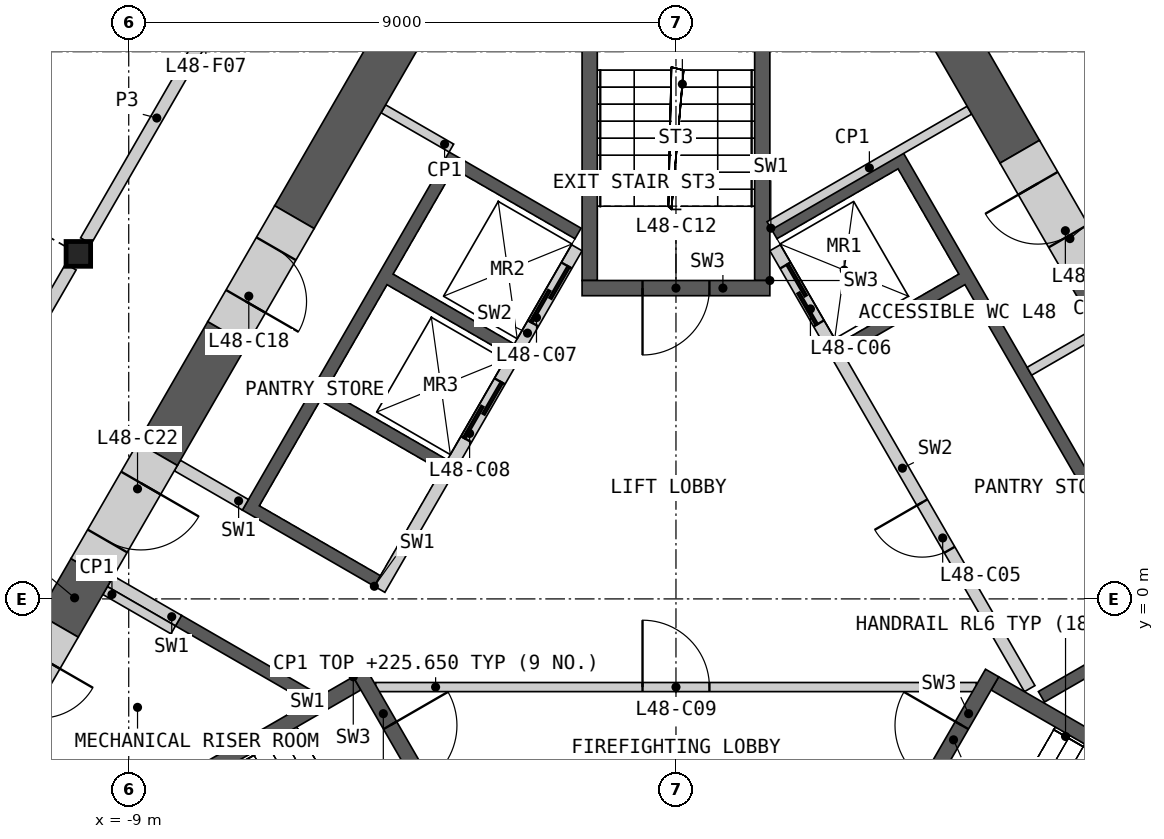
"""IFC4 building model, lengths in metres.
Left out: names, types, materials, properties, quantities, classifications, styles, units other than length and angle.
Written with IfcOpenShell. Run it as: python <this file> out.ifc"""

import sys

from ifc_helpers import new_model, si_unit, direction, frame, frame_2d, origin, origin_2d, place, context, subcontext, project, spatial, polyline, rectangle, i_section, outline, extrude, element, fill, save


model = new_model("IFC4")
c1 = context("Model", 3, precision=1e-05, world=origin(), true_north=direction((0.0, 1.0)))
c2 = subcontext(c1, "Body", "Model", "MODEL_VIEW")
j1 = project(units=[si_unit("LENGTHUNIT", "METRE"), si_unit("PLANEANGLEUNIT", "RADIAN")], contexts=[c1])
p1 = place(None, origin())
s1 = spatial("IfcSite", under=j1, at=p1, CompositionType="ELEMENT")
p2 = place(p1, origin())
s2 = spatial("IfcBuilding", under=s1, at=p2, CompositionType="ELEMENT")
p3 = place(p2, frame((0.0, 0.0, 216.0)))
s3 = spatial("IfcBuildingStorey", under=s2, at=p3, CompositionType="ELEMENT", Elevation=216.0)
p4 = place(p3, frame((-9.828, 5.675, 0.0), z_axis=(0.0, 0.0, 1.0), x_axis=(1.0, 0.0, 0.0)))
e1 = element("IfcColumn", 1, at=p4, inside=s3, PredefinedType="COLUMN", context=c2, shape_type="SweptSolid", body=[
    extrude(i_section(OverallWidth=0.404, OverallDepth=0.407, WebThickness=0.027, FlangeThickness=0.044, at=origin_2d()), origin(), (0.0, 0.0, 1.0), 10.0),
])
p5 = place(p3, origin())
e2 = element("IfcWall", 2, at=p5, inside=s3, PredefinedType="SHEAR", context=c2, shape_type="SweptSolid", body=[
    extrude(outline(polyline([(1.561, 6.097), (3.731, 7.35), (8.231, -0.444), (6.061, -1.697), (5.96, -1.524), (7.952, -0.374), (4.752, 5.169), (2.76, 4.019), (2.66, 4.192), (4.652, 5.342), (3.652, 7.074), (1.66, 5.924), (1.561, 6.097)])), origin(), (0.0, 0.0, 1.0), 9.65),
])
p6 = place(p3, frame((5.817, -1.476, 0.0), z_axis=(0.0, 0.0, 1.0), x_axis=(-0.500002616675, 0.866023893041, 0.0)))
e3 = element("IfcWall", 3, at=p6, inside=s3, PredefinedType="SOLIDWALL", context=c2, shape_type="SweptSolid", body=[
    extrude(rectangle(XDim=8.373, YDim=0.2, at=frame_2d((4.187, 0.0))), origin(), (0.0, 0.0, 1.0), 9.65),
])
p7 = place(p6, frame((2.637, 0.0, 0.0)))
e4 = element("IfcOpeningElement", 4, at=p7, cuts=e3, PredefinedType="OPENING", context=c2, shape_type="SweptSolid", body=[
    extrude(rectangle(XDim=0.9, YDim=2.1, at=frame_2d((0.45, 1.05))), frame((0.0, 0.11, 0.0), z_axis=(0.0, -1.0, 0.0), x_axis=(1.0, 0.0, 0.0)), (0.0, 0.0, 1.0), 0.22),
])
p8 = place(p6, frame((6.937, 0.0, 0.0)))
e5 = element("IfcOpeningElement", 5, at=p8, cuts=e3, PredefinedType="OPENING", context=c2, shape_type="SweptSolid", body=[
    extrude(rectangle(XDim=1.1, YDim=2.1, at=frame_2d((0.55, 1.05))), frame((0.0, 0.11, 0.0), z_axis=(0.0, -1.0, 0.0), x_axis=(1.0, 0.0, 0.0)), (0.0, 0.0, 1.0), 0.22),
])
p9 = place(p3, origin())
e6 = element("IfcWall", 6, at=p9, inside=s3, PredefinedType="SHEAR", context=c2, shape_type="SweptSolid", body=[
    extrude(outline(polyline([(-6.061, -1.697), (-8.231, -0.444), (-8.131, -0.271), (-5.96, -1.524), (-6.061, -1.697)])), origin(), (0.0, 0.0, 1.0), 9.65),
])
p10 = place(p3, origin())
e7 = element("IfcWall", 7, at=p10, inside=s3, PredefinedType="SHEAR", context=c2, shape_type="SweptSolid", body=[
    extrude(outline(polyline([(-4.96, 0.208), (-7.131, 1.461), (-3.731, 7.35), (-1.561, 6.097), (-1.66, 5.924), (-3.652, 7.074), (-4.652, 5.342), (-2.66, 4.192), (-2.76, 4.019), (-4.752, 5.169), (-5.752, 3.437), (-3.76, 2.287), (-3.861, 2.113), (-5.852, 3.263), (-6.852, 1.531), (-4.861, 0.381), (-4.96, 0.208)])), origin(), (0.0, 0.0, 1.0), 9.65),
])
p11 = place(p3, frame((-1.631, 5.776, 0.0), z_axis=(0.0, 0.0, 1.0), x_axis=(-0.499992876559, -0.866029516466, 0.0)))
e8 = element("IfcWall", 8, at=p11, inside=s3, PredefinedType="SOLIDWALL", context=c2, shape_type="SweptSolid", body=[
    extrude(rectangle(XDim=6.486, YDim=0.2, at=frame_2d((3.243, 0.0))), origin(), (0.0, 0.0, 1.0), 9.65),
])
p12 = place(p11, frame((0.337, 0.0, 0.0)))
e9 = element("IfcOpeningElement", 9, at=p12, cuts=e8, PredefinedType="OPENING", context=c2, shape_type="SweptSolid", body=[
    extrude(rectangle(XDim=1.1, YDim=2.1, at=frame_2d((0.55, 1.05))), frame((0.0, 0.11, 0.0), z_axis=(0.0, -1.0, 0.0), x_axis=(1.0, 0.0, 0.0)), (0.0, 0.0, 1.0), 0.22),
])
p13 = place(p11, frame((2.537, 0.0, 0.0)))
e10 = element("IfcOpeningElement", 10, at=p13, cuts=e8, PredefinedType="OPENING", context=c2, shape_type="SweptSolid", body=[
    extrude(rectangle(XDim=1.1, YDim=2.1, at=frame_2d((0.55, 1.05))), frame((0.0, 0.11, 0.0), z_axis=(0.0, -1.0, 0.0), x_axis=(1.0, 0.0, 0.0)), (0.0, 0.0, 1.0), 0.22),
])
for number, where, z_axis, x_axis in (
    (11, (-7.081, 1.548, 0.0), (0.0, 0.0, 1.0), (-0.866, 0.5, 0.0)),
    (12, (-8.181, -0.357, 0.0), (0.0, 0.0, 1.0), (-0.866, 0.5, 0.0)),
):
    element("IfcWall", number, at=place(p3, frame(where, z_axis=z_axis, x_axis=x_axis)), inside=s3, PredefinedType="SHEAR", context=c2, shape_type="SweptSolid", body=[
        extrude(rectangle(XDim=1.293, YDim=0.2, at=frame_2d((0.646, 0.0))), origin(), (0.0, 0.0, 1.0), 9.65),
    ])
p14 = place(p3, frame((-4.941, -1.45, 0.0), z_axis=(0.0, 0.0, 1.0), x_axis=(1.0, 0.0, 0.0)))
e13 = element("IfcWall", 13, at=p14, inside=s3, PredefinedType="PARTITIONING", context=c2, shape_type="SweptSolid", body=[
    extrude(rectangle(XDim=9.882, YDim=0.15, at=frame_2d((4.941, 0.0))), origin(), (0.0, 0.0, 1.0), 9.65),
])
p15 = place(p14, frame((4.391, 0.0, 0.0)))
e14 = element("IfcOpeningElement", 14, at=p15, cuts=e13, PredefinedType="OPENING", context=c2, shape_type="SweptSolid", body=[
    extrude(rectangle(XDim=1.1, YDim=2.1, at=frame_2d((0.55, 1.05))), frame((0.0, 0.085, 0.0), z_axis=(0.0, -1.0, 0.0), x_axis=(1.0, 0.0, 0.0)), (0.0, 0.0, 1.0), 0.17),
])
p16 = place(p3, origin())
e15 = element("IfcWall", 15, at=p16, inside=s3, PredefinedType="SHEAR", context=c2, shape_type="SweptSolid", body=[
    extrude(outline(polyline([(-5.307, -1.281), (-10.374, -4.206), (-10.032, -4.298), (-5.182, -1.498), (-5.307, -1.281)])), origin(), (0.0, 0.0, 1.0), 9.65),
])
p17 = place(p3, frame((-5.199, -1.219, 0.0), z_axis=(0.0, 0.0, 1.0), x_axis=(0.499982516597, -0.866035497597, 0.0)))
e16 = element("IfcWall", 16, at=p17, inside=s3, PredefinedType="SHEAR", context=c2, shape_type="SweptSolid", body=[
    extrude(rectangle(XDim=3.088, YDim=0.25, at=frame_2d((1.544, 0.0))), origin(), (0.0, 0.0, 1.0), 9.65),
])
p18 = place(p17, frame((0.994, 0.0, 0.0)))
e17 = element("IfcOpeningElement", 17, at=p18, cuts=e16, PredefinedType="OPENING", context=c2, shape_type="SweptSolid", body=[
    extrude(rectangle(XDim=1.1, YDim=2.1, at=frame_2d((0.55, 1.05))), frame((0.0, 0.135, 0.0), z_axis=(0.0, -1.0, 0.0), x_axis=(1.0, 0.0, 0.0)), (0.0, 0.0, 1.0), 0.27),
])
p19 = place(p3, origin())
e18 = element("IfcWall", 18, at=p19, inside=s3, PredefinedType="SHEAR", context=c2, shape_type="SweptSolid", body=[
    extrude(outline(polyline([(10.032, -4.298), (10.374, -4.206), (5.307, -1.281), (5.182, -1.498), (10.032, -4.298)])), origin(), (0.0, 0.0, 1.0), 9.65),
])
p20 = place(p3, frame((3.655, -3.893, 0.0), z_axis=(0.0, 0.0, 1.0), x_axis=(0.499982516597, 0.866035497597, 0.0)))
e19 = element("IfcWall", 19, at=p20, inside=s3, PredefinedType="SHEAR", context=c2, shape_type="SweptSolid", body=[
    extrude(rectangle(XDim=3.088, YDim=0.25, at=frame_2d((1.544, 0.0))), origin(), (0.0, 0.0, 1.0), 9.65),
])
p21 = place(p20, frame((0.994, 0.0, 0.0)))
e20 = element("IfcOpeningElement", 20, at=p21, cuts=e19, PredefinedType="OPENING", context=c2, shape_type="SweptSolid", body=[
    extrude(rectangle(XDim=1.1, YDim=2.1, at=frame_2d((0.55, 1.05))), frame((0.0, 0.135, 0.0), z_axis=(0.0, -1.0, 0.0), x_axis=(1.0, 0.0, 0.0)), (0.0, 0.0, 1.0), 0.27),
])
p22 = place(p3, origin())
e21 = element("IfcWall", 21, at=p22, inside=s3, PredefinedType="SHEAR", context=c2, shape_type="SweptSolid", body=[
    extrude(outline(polyline([(1.544, 5.237), (1.544, 11.087), (1.294, 10.837), (1.294, 5.237), (1.544, 5.237)])), origin(), (0.0, 0.0, 1.0), 9.65),
])
p23 = place(p3, origin())
e22 = element("IfcWall", 22, at=p23, inside=s3, PredefinedType="SHEAR", context=c2, shape_type="SweptSolid", body=[
    extrude(outline(polyline([(-1.294, 10.837), (-1.544, 11.087), (-1.544, 5.237), (-1.294, 5.237), (-1.294, 10.837)])), origin(), (0.0, 0.0, 1.0), 9.65),
])
p24 = place(p3, frame((1.544, 5.112, 0.0), z_axis=(0.0, 0.0, 1.0), x_axis=(-1.0, 0.0, 0.0)))
e23 = element("IfcWall", 23, at=p24, inside=s3, PredefinedType="SHEAR", context=c2, shape_type="SweptSolid", body=[
    extrude(rectangle(XDim=3.088, YDim=0.25, at=frame_2d((1.544, 0.0))), origin(), (0.0, 0.0, 1.0), 9.65),
])
p25 = place(p24, frame((0.994, 0.0, 0.0)))
e24 = element("IfcOpeningElement", 24, at=p25, cuts=e23, PredefinedType="OPENING", context=c2, shape_type="SweptSolid", body=[
    extrude(rectangle(XDim=1.1, YDim=2.1, at=frame_2d((0.55, 1.05))), frame((0.0, 0.135, 0.0), z_axis=(0.0, -1.0, 0.0), x_axis=(1.0, 0.0, 0.0)), (0.0, 0.0, 1.0), 0.27),
])
for number, where, z_axis, x_axis in (
    (25, (-8.268, -0.509, 0.0), (0.0, 0.0, 1.0), (-0.866, 0.5, 0.0)),
    (26, (-3.693, 7.415, 0.0), (0.0, 0.0, 1.0), (-0.866, 0.5, 0.0)),
    (27, (6.932, 4.391, 0.0), (0.0, 0.0, 1.0), (-0.866, -0.5, 0.0)),
):
    element("IfcWall", number, at=place(p3, frame(where, z_axis=z_axis, x_axis=x_axis)), inside=s3, PredefinedType="PARTITIONING", context=c2, shape_type="SweptSolid", body=[
        extrude(rectangle(XDim=1.293, YDim=0.15, at=frame_2d((0.646, 0.0))), origin(), (0.0, 0.0, 1.0), 9.65),
    ])
p26 = place(p3, frame((4.826, 8.039, 0.0), z_axis=(0.0, 0.0, 1.0), x_axis=(-0.86601654697, -0.500015340139, 0.0)))
e28 = element("IfcWall", 28, at=p26, inside=s3, PredefinedType="PARTITIONING", context=c2, shape_type="SweptSolid", body=[
    extrude(rectangle(XDim=3.8, YDim=0.15, at=frame_2d((1.9, 0.0))), origin(), (0.0, 0.0, 1.0), 9.65),
])
p27 = place(p3, frame((5.654, 7.355, 0.0), z_axis=(0.0, 0.0, 1.0), x_axis=(-0.4999705729, 0.866042392862, 0.0)))
e29 = element("IfcWall", 29, at=p27, inside=s3, PredefinedType="SHEAR", context=c2, shape_type="SweptSolid", body=[
    extrude(rectangle(XDim=4.77, YDim=0.75, at=frame_2d((2.385, 0.0))), origin(), (0.0, 0.0, 1.0), 9.65),
])
p28 = place(p3, frame((8.211, 2.926, 0.0), z_axis=(0.0, 0.0, 1.0), x_axis=(-0.500022172694, 0.866012601995, 0.0)))
e30 = element("IfcWall", 30, at=p28, inside=s3, PredefinedType="SHEAR", context=c2, shape_type="SweptSolid", body=[
    extrude(rectangle(XDim=2.914, YDim=0.75, at=frame_2d((1.457, 0.0))), origin(), (0.0, 0.0, 1.0), 9.65),
])
p29 = place(p3, frame((-0.325, 16.585, 0.0), z_axis=(0.0, 0.0, 1.0), x_axis=(-0.500008939514, -0.866020242492, 0.0)))
e31 = element("IfcWall", 31, at=p29, inside=s3, PredefinedType="SHEAR", context=c2, shape_type="SweptSolid", body=[
    extrude(rectangle(XDim=11.901, YDim=0.75, at=frame_2d((5.951, 0.0))), origin(), (0.0, 0.0, 1.0), 9.65),
])
p30 = place(p3, frame((-7.375, 4.374, 0.0), z_axis=(0.0, 0.0, 1.0), x_axis=(-0.499952165731, -0.866053019151, 0.0)))
e32 = element("IfcWall", 32, at=p30, inside=s3, PredefinedType="SHEAR", context=c2, shape_type="SweptSolid", body=[
    extrude(rectangle(XDim=2.3, YDim=0.75, at=frame_2d((1.15, 0.0))), origin(), (0.0, 0.0, 1.0), 9.65),
])
p31 = place(p3, frame((-9.625, 0.477, 0.0), z_axis=(0.0, 0.0, 1.0), x_axis=(-0.499928435111, -0.86606671785, 0.0)))
e33 = element("IfcWall", 33, at=p31, inside=s3, PredefinedType="SHEAR", context=c2, shape_type="SweptSolid", body=[
    extrude(rectangle(XDim=1.06, YDim=0.75, at=frame_2d((0.53, 0.0))), origin(), (0.0, 0.0, 1.0), 9.65),
])
p32 = place(p3, frame((-6.275, 6.279, 0.0), z_axis=(0.0, 0.0, 1.0), x_axis=(-0.499946605688, -0.86605622881, 0.0)))
e34 = element("IfcWall", 34, at=p32, inside=s3, PredefinedType="SHEAR", context=c2, shape_type="SweptSolid", body=[
    extrude(rectangle(XDim=2.2, YDim=0.75, at=frame_2d((1.1, 0.0))), origin(), (0.0, 0.0, 1.0), 9.65),
])
p33 = place(p32, frame((0.6, 0.0, 0.0)))
e35 = element("IfcOpeningElement", 35, at=p33, cuts=e34, PredefinedType="OPENING", context=c2, shape_type="SweptSolid", body=[
    extrude(rectangle(XDim=1.0, YDim=2.1, at=frame_2d((0.5, 1.05))), frame((0.0, 0.385, 0.0), z_axis=(0.0, -1.0, 0.0), x_axis=(1.0, 0.0, 0.0)), (0.0, 0.0, 1.0), 0.77),
])
p34 = place(p3, frame((6.754, 5.45, 0.0), z_axis=(0.0, 0.0, 1.0), x_axis=(-0.499994660107, 0.866028486751, 0.0)))
e36 = element("IfcWall", 36, at=p34, inside=s3, PredefinedType="SHEAR", context=c2, shape_type="SweptSolid", body=[
    extrude(rectangle(XDim=2.2, YDim=0.75, at=frame_2d((1.1, 0.0))), origin(), (0.0, 0.0, 1.0), 9.65),
])
p35 = place(p34, frame((0.6, 0.0, 0.0)))
e37 = element("IfcOpeningElement", 37, at=p35, cuts=e36, PredefinedType="OPENING", context=c2, shape_type="SweptSolid", body=[
    extrude(rectangle(XDim=1.0, YDim=2.1, at=frame_2d((0.5, 1.05))), frame((0.0, 0.385, 0.0), z_axis=(0.0, -1.0, 0.0), x_axis=(1.0, 0.0, 0.0)), (0.0, 0.0, 1.0), 0.77),
])
p36 = place(p3, frame((-10.156, -0.442, 0.0), z_axis=(0.0, 0.0, 1.0), x_axis=(-0.499946605688, -0.86605622881, 0.0)))
e38 = element("IfcWall", 38, at=p36, inside=s3, PredefinedType="SHEAR", context=c2, shape_type="SweptSolid", body=[
    extrude(rectangle(XDim=2.2, YDim=0.75, at=frame_2d((1.1, 0.0))), origin(), (0.0, 0.0, 1.0), 9.65),
])
p37 = place(p36, frame((0.6, 0.0, 0.0)))
e39 = element("IfcOpeningElement", 39, at=p37, cuts=e38, PredefinedType="OPENING", context=c2, shape_type="SweptSolid", body=[
    extrude(rectangle(XDim=1.0, YDim=2.1, at=frame_2d((0.5, 1.05))), frame((0.0, 0.385, 0.0), z_axis=(0.0, -1.0, 0.0), x_axis=(1.0, 0.0, 0.0)), (0.0, 0.0, 1.0), 0.77),
])
p38 = place(p3, frame((-8.525, 2.382, 0.0), z_axis=(0.0, 0.0, 1.0), x_axis=(-0.500077893725, -0.86598042715, 0.0)))
e40 = element("IfcWall", 40, at=p38, inside=s3, PredefinedType="SHEAR", context=c2, shape_type="SweptSolid", body=[
    extrude(rectangle(XDim=2.2, YDim=0.75, at=frame_2d((1.1, 0.0))), origin(), (0.0, 0.0, 1.0), 9.65),
])
p39 = place(p38, frame((0.55, 0.0, 0.0)))
e41 = element("IfcOpeningElement", 41, at=p39, cuts=e40, PredefinedType="OPENING", context=c2, shape_type="SweptSolid", body=[
    extrude(rectangle(XDim=1.1, YDim=2.1, at=frame_2d((0.55, 1.05))), frame((0.0, 0.385, 0.0), z_axis=(0.0, -1.0, 0.0), x_axis=(1.0, 0.0, 0.0)), (0.0, 0.0, 1.0), 0.77),
])
p40 = place(p3, frame((5.038, 13.972, 0.0), z_axis=(0.0, 0.0, 1.0), x_axis=(0.50000393355, -0.866023132736, 0.0)))
e42 = element("IfcWall", 42, at=p40, inside=s3, PredefinedType="PARTITIONING", context=c2, shape_type="SweptSolid", body=[
    extrude(rectangle(XDim=9.335, YDim=0.2, at=frame_2d((4.667, 0.0))), origin(), (0.0, 0.0, 1.0), 9.65),
])
p41 = place(p40, frame((3.768, 0.0, 0.0)))
e43 = element("IfcOpeningElement", 43, at=p41, cuts=e42, PredefinedType="OPENING", context=c2, shape_type="SweptSolid", body=[
    extrude(rectangle(XDim=1.8, YDim=2.1, at=frame_2d((0.9, 1.05))), frame((0.0, 0.11, 0.0), z_axis=(0.0, -1.0, 0.0), x_axis=(1.0, 0.0, 0.0)), (0.0, 0.0, 1.0), 0.22),
])
p42 = place(p3, frame((-9.705, 5.888, 0.0), z_axis=(0.0, 0.0, 1.0), x_axis=(0.50000393355, 0.866023132736, 0.0)))
e44 = element("IfcWall", 44, at=p42, inside=s3, PredefinedType="PARTITIONING", context=c2, shape_type="SweptSolid", body=[
    extrude(rectangle(XDim=9.335, YDim=0.2, at=frame_2d((4.667, 0.0))), origin(), (0.0, 0.0, 1.0), 9.65),
])
p43 = place(p42, frame((3.768, 0.0, 0.0)))
e45 = element("IfcOpeningElement", 45, at=p43, cuts=e44, PredefinedType="OPENING", context=c2, shape_type="SweptSolid", body=[
    extrude(rectangle(XDim=1.8, YDim=2.1, at=frame_2d((0.9, 1.05))), frame((0.0, 0.11, 0.0), z_axis=(0.0, -1.0, 0.0), x_axis=(1.0, 0.0, 0.0)), (0.0, 0.0, 1.0), 0.22),
])
p44 = place(p3, frame((-14.619, -2.624, 0.0), z_axis=(0.0, 0.0, 1.0), x_axis=(0.50000393355, 0.866023132736, 0.0)))
e46 = element("IfcWall", 46, at=p44, inside=s3, PredefinedType="PARTITIONING", context=c2, shape_type="SweptSolid", body=[
    extrude(rectangle(XDim=9.335, YDim=0.2, at=frame_2d((4.667, 0.0))), origin(), (0.0, 0.0, 1.0), 9.65),
])
p45 = place(p7, origin())
e47 = element("IfcDoor", 47, at=p45, inside=s3, OperationType="SINGLE_SWING_RIGHT", PredefinedType="DOOR", context=c2, shape_type="SweptSolid", body=[
    extrude(rectangle(XDim=0.9, YDim=2.1, at=frame_2d((0.45, 1.05))), frame((0.0, 0.025, 0.0), z_axis=(0.0, -1.0, 0.0), x_axis=(1.0, 0.0, 0.0)), (0.0, 0.0, 1.0), 0.05),
])
fill(e4, e47)
p46 = place(p8, origin())
e48 = element("IfcDoor", 48, at=p46, inside=s3, OperationType="SLIDING_TO_LEFT", PredefinedType="DOOR", context=c2, shape_type="SweptSolid", body=[
    extrude(rectangle(XDim=1.1, YDim=2.1, at=frame_2d((0.55, 1.05))), frame((0.0, 0.025, 0.0), z_axis=(0.0, -1.0, 0.0), x_axis=(1.0, 0.0, 0.0)), (0.0, 0.0, 1.0), 0.05),
])
fill(e5, e48)
p47 = place(p12, origin())
e49 = element("IfcDoor", 49, at=p47, inside=s3, OperationType="SLIDING_TO_LEFT", PredefinedType="DOOR", context=c2, shape_type="SweptSolid", body=[
    extrude(rectangle(XDim=1.1, YDim=2.1, at=frame_2d((0.55, 1.05))), frame((0.0, 0.025, 0.0), z_axis=(0.0, -1.0, 0.0), x_axis=(1.0, 0.0, 0.0)), (0.0, 0.0, 1.0), 0.05),
])
fill(e9, e49)
p48 = place(p13, origin())
e50 = element("IfcDoor", 50, at=p48, inside=s3, OperationType="SLIDING_TO_LEFT", PredefinedType="DOOR", context=c2, shape_type="SweptSolid", body=[
    extrude(rectangle(XDim=1.1, YDim=2.1, at=frame_2d((0.55, 1.05))), frame((0.0, 0.025, 0.0), z_axis=(0.0, -1.0, 0.0), x_axis=(1.0, 0.0, 0.0)), (0.0, 0.0, 1.0), 0.05),
])
fill(e10, e50)
p49 = place(p15, origin())
e51 = element("IfcDoor", 51, at=p49, inside=s3, OperationType="SINGLE_SWING_LEFT", PredefinedType="DOOR", context=c2, shape_type="SweptSolid", body=[
    extrude(rectangle(XDim=1.1, YDim=2.1, at=frame_2d((0.55, 1.05))), frame((0.0, 0.025, 0.0), z_axis=(0.0, -1.0, 0.0), x_axis=(1.0, 0.0, 0.0)), (0.0, 0.0, 1.0), 0.05),
])
fill(e14, e51)
p50 = place(p18, origin())
e52 = element("IfcDoor", 52, at=p50, inside=s3, OperationType="SINGLE_SWING_LEFT", PredefinedType="DOOR", context=c2, shape_type="SweptSolid", body=[
    extrude(rectangle(XDim=1.1, YDim=2.1, at=frame_2d((0.55, 1.05))), frame((0.0, 0.025, 0.0), z_axis=(0.0, -1.0, 0.0), x_axis=(1.0, 0.0, 0.0)), (0.0, 0.0, 1.0), 0.05),
])
fill(e17, e52)
p51 = place(p21, origin())
e53 = element("IfcDoor", 53, at=p51, inside=s3, OperationType="SINGLE_SWING_RIGHT", PredefinedType="DOOR", context=c2, shape_type="SweptSolid", body=[
    extrude(rectangle(XDim=1.1, YDim=2.1, at=frame_2d((0.55, 1.05))), frame((0.0, 0.025, 0.0), z_axis=(0.0, -1.0, 0.0), x_axis=(1.0, 0.0, 0.0)), (0.0, 0.0, 1.0), 0.05),
])
fill(e20, e53)
p52 = place(p25, origin())
e54 = element("IfcDoor", 54, at=p52, inside=s3, OperationType="SINGLE_SWING_RIGHT", PredefinedType="DOOR", context=c2, shape_type="SweptSolid", body=[
    extrude(rectangle(XDim=1.1, YDim=2.1, at=frame_2d((0.55, 1.05))), frame((0.0, 0.025, 0.0), z_axis=(0.0, -1.0, 0.0), x_axis=(1.0, 0.0, 0.0)), (0.0, 0.0, 1.0), 0.05),
])
fill(e24, e54)
p53 = place(p33, origin())
e55 = element("IfcDoor", 55, at=p53, inside=s3, OperationType="SINGLE_SWING_RIGHT", PredefinedType="DOOR", context=c2, shape_type="SweptSolid", body=[
    extrude(rectangle(XDim=1.0, YDim=2.1, at=frame_2d((0.5, 1.05))), frame((0.0, 0.13, 0.0), z_axis=(0.0, -1.0, 0.0), x_axis=(1.0, 0.0, 0.0)), (0.0, 0.0, 1.0), 0.05),
])
fill(e35, e55)
p54 = place(p35, origin())
e56 = element("IfcDoor", 56, at=p54, inside=s3, OperationType="SINGLE_SWING_RIGHT", PredefinedType="DOOR", context=c2, shape_type="SweptSolid", body=[
    extrude(rectangle(XDim=1.0, YDim=2.1, at=frame_2d((0.5, 1.05))), frame((0.0, 0.13, 0.0), z_axis=(0.0, -1.0, 0.0), x_axis=(1.0, 0.0, 0.0)), (0.0, 0.0, 1.0), 0.05),
])
fill(e37, e56)
p55 = place(p39, origin())
e57 = element("IfcDoor", 57, at=p55, inside=s3, OperationType="SINGLE_SWING_LEFT", PredefinedType="DOOR", context=c2, shape_type="SweptSolid", body=[
    extrude(rectangle(XDim=1.1, YDim=2.1, at=frame_2d((0.55, 1.05))), frame((0.0, 0.13, 0.0), z_axis=(0.0, -1.0, 0.0), x_axis=(1.0, 0.0, 0.0)), (0.0, 0.0, 1.0), 0.05),
])
fill(e41, e57)
save(model, sys.argv[1])
